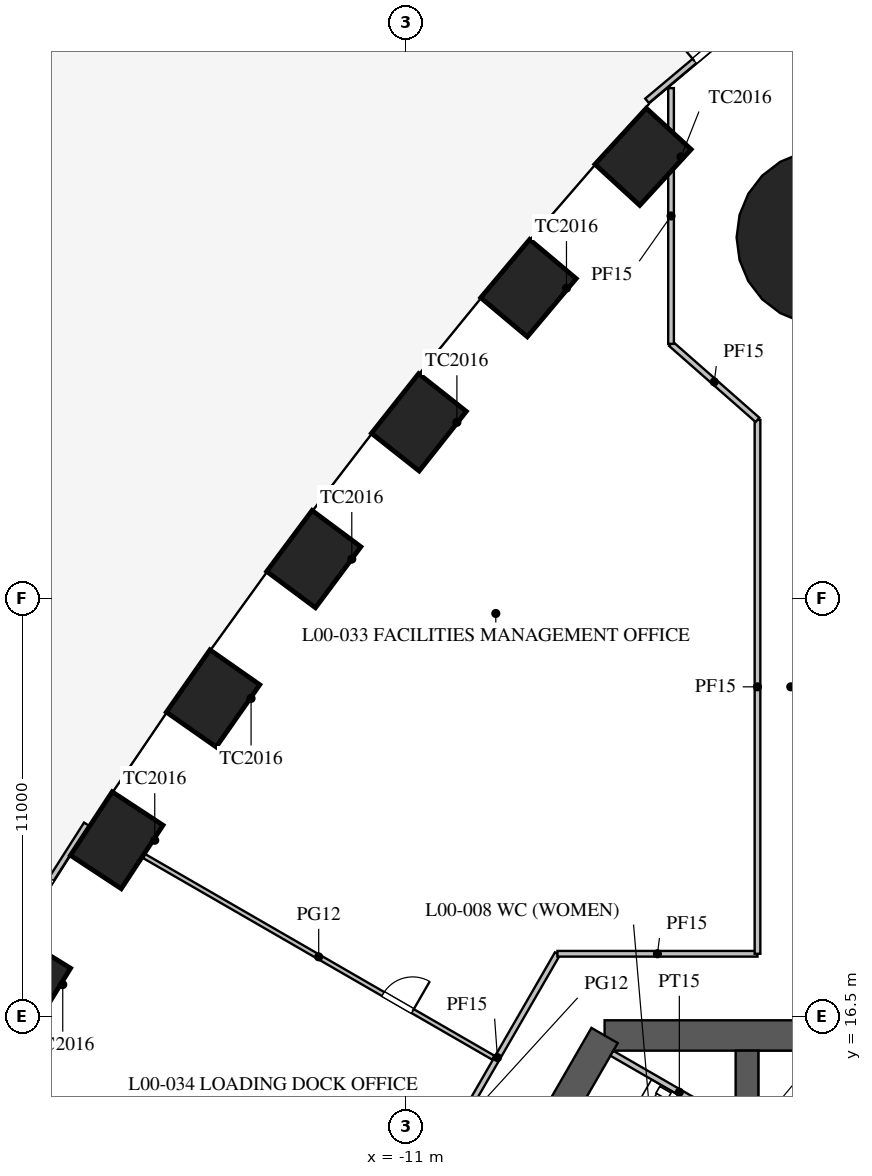
"""IFC4 building model, lengths in metres.
Left out: names, types, materials, properties, quantities, classifications, styles, units other than length and angle.
Written with IfcOpenShell. Run it as: python <this file> out.ifc"""

import sys

from ifc_helpers import new_model, si_unit, direction, frame, frame_2d, origin, origin_2d, place, context, subcontext, project, spatial, rectangle, circle, extrude, element, fill, save


model = new_model("IFC4")
c1 = context("Model", 3, precision=1e-05, world=origin(), true_north=direction((0.0, 1.0)))
c2 = subcontext(c1, "Body", "Model", "MODEL_VIEW")
j1 = project(units=[si_unit("LENGTHUNIT", "METRE"), si_unit("PLANEANGLEUNIT", "RADIAN")], contexts=[c1])
p1 = place(None, origin())
s1 = spatial("IfcSite", under=j1, at=p1, CompositionType="ELEMENT")
p2 = place(p1, origin())
s2 = spatial("IfcBuilding", under=s1, at=p2, CompositionType="ELEMENT")
p3 = place(p2, origin())
s3 = spatial("IfcBuildingStorey", under=s2, at=p3, CompositionType="ELEMENT", Elevation=0.0)
for number, where, z_axis, x_axis in (
    (1, (-4.762, 39.122, 0.0), (0.0, 0.0, 1.0), (-0.676, -0.737, 0.0)),
    (2, (-7.776, 35.667, 0.0), (0.0, 0.0, 1.0), (-0.643, -0.766, 0.0)),
    (3, (-10.66, 32.135, 0.0), (0.0, 0.0, 1.0), (-0.62, -0.784, 0.0)),
    (4, (-13.426, 28.536, 0.0), (0.0, 0.0, 1.0), (-0.597, -0.802, 0.0)),
    (5, (-16.076, 24.87, 0.0), (0.0, 0.0, 1.0), (-0.574, -0.819, 0.0)),
    (6, (-18.611, 21.137, 0.0), (0.0, 0.0, 1.0), (-0.549, -0.836, 0.0)),
    (7, (-21.031, 17.339, 0.0), (0.0, 0.0, 1.0), (-0.525, -0.851, 0.0)),
):
    element("IfcColumn", number, at=place(p3, frame(where, z_axis=z_axis, x_axis=x_axis)), inside=s3, PredefinedType="COLUMN", context=c2, shape_type="SweptSolid", body=[
        extrude(rectangle(XDim=2.0, YDim=1.6, at=origin_2d()), origin(), (0.0, 0.0, 1.0), 6.5),
    ])
p4 = place(p3, frame((0.0, 37.0, 0.0), z_axis=(0.0, 0.0, 1.0), x_axis=(1.0, 0.0, 0.0)))
e8 = element("IfcColumn", 8, at=p4, inside=s3, PredefinedType="COLUMN", context=c2, shape_type="SweptSolid", body=[
    extrude(circle(Radius=2.3, at=origin_2d()), origin(), (0.0, 0.0, 1.0), 6.5),
])
p5 = place(p3, frame((5.773, 16.0, 0.0), z_axis=(0.0, 0.0, 1.0), x_axis=(-1.0, 0.0, 0.0)))
e9 = element("IfcWall", 9, at=p5, inside=s3, PredefinedType="SHEAR", context=c2, shape_type="SweptSolid", body=[
    extrude(rectangle(XDim=11.547, YDim=0.8, at=frame_2d((5.773, 0.0))), origin(), (0.0, 0.0, 1.0), 6.5),
])
p6 = place(p3, frame((-5.773, 16.0, 0.0), z_axis=(0.0, 0.0, 1.0), x_axis=(-0.500002442456, -0.866023993627, 0.0)))
e10 = element("IfcWall", 10, at=p6, inside=s3, PredefinedType="SHEAR", context=c2, shape_type="SweptSolid", body=[
    extrude(rectangle(XDim=21.939, YDim=0.8, at=frame_2d((10.97, 0.0))), origin(), (0.0, 0.0, 1.0), 6.5),
])
p7 = place(p6, frame((17.27, 0.0, 0.0)))
e11 = element("IfcOpeningElement", 11, at=p7, cuts=e10, PredefinedType="OPENING", context=c2, shape_type="SweptSolid", body=[
    extrude(rectangle(XDim=1.2, YDim=2.1, at=frame_2d((0.6, 1.05))), frame((0.0, 0.41, 0.0), z_axis=(0.0, -1.0, 0.0), x_axis=(1.0, 0.0, 0.0)), (0.0, 0.0, 1.0), 0.82),
])
p8 = place(p6, frame((3.27, 0.0, 0.0)))
e12 = element("IfcOpeningElement", 12, at=p8, cuts=e10, PredefinedType="OPENING", context=c2, shape_type="SweptSolid", body=[
    extrude(rectangle(XDim=1.6, YDim=2.1, at=frame_2d((0.8, 1.05))), frame((0.0, 0.41, 0.0), z_axis=(0.0, -1.0, 0.0), x_axis=(1.0, 0.0, 0.0)), (0.0, 0.0, 1.0), 0.82),
])
p9 = place(p3, frame((-2.025, 6.525, 0.0), z_axis=(0.0, 0.0, 1.0), x_axis=(0.0, 1.0, 0.0)))
e13 = element("IfcWall", 13, at=p9, inside=s3, PredefinedType="SHEAR", context=c2, shape_type="SweptSolid", body=[
    extrude(rectangle(XDim=9.075, YDim=0.6, at=frame_2d((4.538, 0.0))), origin(), (0.0, 0.0, 1.0), 6.5),
])
p10 = place(p9, frame((0.265, 0.0, 0.0)))
e14 = element("IfcOpeningElement", 14, at=p10, cuts=e13, PredefinedType="OPENING", context=c2, shape_type="SweptSolid", body=[
    extrude(rectangle(XDim=1.6, YDim=2.1, at=frame_2d((0.8, 1.05))), frame((0.0, 0.31, 0.0), z_axis=(0.0, -1.0, 0.0), x_axis=(1.0, 0.0, 0.0)), (0.0, 0.0, 1.0), 0.62),
])
p11 = place(p3, frame((-1.915, 42.896, 0.0), z_axis=(0.0, 0.0, 1.0), x_axis=(-0.766030048501, -0.642804764134, 0.0)))
e15 = element("IfcWall", 15, at=p11, inside=s3, PredefinedType="SOLIDWALL", context=c2, shape_type="SweptSolid", body=[
    extrude(rectangle(XDim=3.578, YDim=0.15, at=frame_2d((1.789, 0.0))), origin(), (0.0, 0.0, 1.0), 6.48),
])
p12 = place(p11, frame((0.35, 0.0, 0.0)))
e16 = element("IfcOpeningElement", 16, at=p12, cuts=e15, PredefinedType="OPENING", context=c2, shape_type="SweptSolid", body=[
    extrude(rectangle(XDim=1.6, YDim=2.4, at=frame_2d((0.8, 1.2))), frame((0.0, 0.085, 0.0), z_axis=(0.0, -1.0, 0.0), x_axis=(1.0, 0.0, 0.0)), (0.0, 0.0, 1.0), 0.17),
])
p13 = place(p3, frame((-19.408, 21.562, 0.0), z_axis=(0.0, 0.0, 1.0), x_axis=(-0.537210337964, -0.843448310677, 0.0)))
e17 = element("IfcWall", 17, at=p13, inside=s3, PredefinedType="SOLIDWALL", context=c2, shape_type="SweptSolid", body=[
    extrude(rectangle(XDim=4.434, YDim=0.15, at=frame_2d((2.217, 0.0))), origin(), (0.0, 0.0, 1.0), 6.48),
])
p14 = place(p13, frame((1.717, 0.0, 0.0)))
e18 = element("IfcOpeningElement", 18, at=p14, cuts=e17, PredefinedType="OPENING", context=c2, shape_type="SweptSolid", body=[
    extrude(rectangle(XDim=1.0, YDim=2.4, at=frame_2d((0.5, 1.2))), frame((0.0, 0.085, 0.0), z_axis=(0.0, -1.0, 0.0), x_axis=(1.0, 0.0, 0.0)), (0.0, 0.0, 1.0), 0.17),
])
p15 = place(p3, frame((-2.031, 13.482, 0.0), z_axis=(0.0, 0.0, 1.0), x_axis=(-0.866050731258, 0.499956128963, 0.0)))
e19 = element("IfcWall", 19, at=p15, inside=s3, PredefinedType="PARTITIONING", context=c2, shape_type="SweptSolid", body=[
    extrude(rectangle(XDim=4.1, YDim=0.15, at=frame_2d((2.05, 0.0))), origin(), (0.0, 0.0, 1.0), 6.3),
])
p16 = place(p3, frame((-8.703, 15.417, 0.0), z_axis=(0.0, 0.0, 1.0), x_axis=(-0.866031156864, 0.499990035242, 0.0)))
e20 = element("IfcWall", 20, at=p16, inside=s3, PredefinedType="PARTITIONING", context=c2, shape_type="SweptSolid", body=[
    extrude(rectangle(XDim=10.61, YDim=0.12, at=frame_2d((5.305, 0.0))), origin(), (0.0, 0.0, 1.0), 5.0),
])
p17 = place(p16, frame((2.45, 0.0, 0.0)))
e21 = element("IfcOpeningElement", 21, at=p17, cuts=e20, PredefinedType="OPENING", context=c2, shape_type="SweptSolid", body=[
    extrude(rectangle(XDim=0.9, YDim=2.1, at=frame_2d((0.45, 1.05))), frame((0.0, 0.07, 0.0), z_axis=(0.0, -1.0, 0.0), x_axis=(1.0, 0.0, 0.0)), (0.0, 0.0, 1.0), 0.14),
])
p18 = place(p3, frame((-10.17, 12.685, 0.0), z_axis=(0.0, 0.0, 1.0), x_axis=(0.4999836609, 0.866034836963, 0.0)))
e22 = element("IfcWall", 22, at=p18, inside=s3, PredefinedType="PARTITIONING", context=c2, shape_type="SweptSolid", body=[
    extrude(rectangle(XDim=6.311, YDim=0.15, at=frame_2d((3.155, 0.0))), origin(), (0.0, 0.0, 1.0), 6.3),
])
p19 = place(p3, frame((-7.015, 18.15, 0.0), z_axis=(0.0, 0.0, 1.0), x_axis=(1.0, 0.0, 0.0)))
e23 = element("IfcWall", 23, at=p19, inside=s3, PredefinedType="PARTITIONING", context=c2, shape_type="SweptSolid", body=[
    extrude(rectangle(XDim=5.265, YDim=0.15, at=frame_2d((2.632, 0.0))), origin(), (0.0, 0.0, 1.0), 6.3),
])
p20 = place(p3, frame((-1.75, 18.15, 0.0), z_axis=(0.0, 0.0, 1.0), x_axis=(0.0, 1.0, 0.0)))
e24 = element("IfcWall", 24, at=p20, inside=s3, PredefinedType="PARTITIONING", context=c2, shape_type="SweptSolid", body=[
    extrude(rectangle(XDim=14.05, YDim=0.15, at=frame_2d((7.025, 0.0))), origin(), (0.0, 0.0, 1.0), 6.3),
])
p21 = place(p3, frame((-1.75, 32.2, 0.0), z_axis=(0.0, 0.0, 1.0), x_axis=(-0.751026818711, 0.660271699815, 0.0)))
e25 = element("IfcWall", 25, at=p21, inside=s3, PredefinedType="PARTITIONING", context=c2, shape_type="SweptSolid", body=[
    extrude(rectangle(XDim=3.029, YDim=0.15, at=frame_2d((1.515, 0.0))), origin(), (0.0, 0.0, 1.0), 5.7),
])
p22 = place(p3, frame((-4.025, 34.2, 0.0), z_axis=(0.0, 0.0, 1.0), x_axis=(0.0, 1.0, 0.0)))
e26 = element("IfcWall", 26, at=p22, inside=s3, PredefinedType="PARTITIONING", context=c2, shape_type="SweptSolid", body=[
    extrude(rectangle(XDim=6.73, YDim=0.15, at=frame_2d((3.365, 0.0))), origin(), (0.0, 0.0, 1.0), 6.3),
])
p23 = place(p12, frame((1.6, 0.0, 0.0), z_axis=(0.0, 0.0, 1.0), x_axis=(-1.0, 0.0, 0.0)))
e27 = element("IfcDoor", 27, at=p23, inside=s3, OperationType="DOUBLE_DOOR_SINGLE_SWING", PredefinedType="DOOR", context=c2, shape_type="SweptSolid", body=[
    extrude(rectangle(XDim=1.6, YDim=2.4, at=frame_2d((0.8, 1.2))), frame((0.0, 0.025, 0.0), z_axis=(0.0, -1.0, 0.0), x_axis=(1.0, 0.0, 0.0)), (0.0, 0.0, 1.0), 0.05),
])
fill(e16, e27)
p24 = place(p17, frame((0.9, 0.0, 0.0), z_axis=(0.0, 0.0, 1.0), x_axis=(-1.0, 0.0, 0.0)))
e28 = element("IfcDoor", 28, at=p24, inside=s3, OperationType="SINGLE_SWING_RIGHT", PredefinedType="DOOR", context=c2, shape_type="SweptSolid", body=[
    extrude(rectangle(XDim=0.9, YDim=2.1, at=frame_2d((0.45, 1.05))), frame((0.0, 0.025, 0.0), z_axis=(0.0, -1.0, 0.0), x_axis=(1.0, 0.0, 0.0)), (0.0, 0.0, 1.0), 0.05),
])
fill(e21, e28)
save(model, sys.argv[1])
